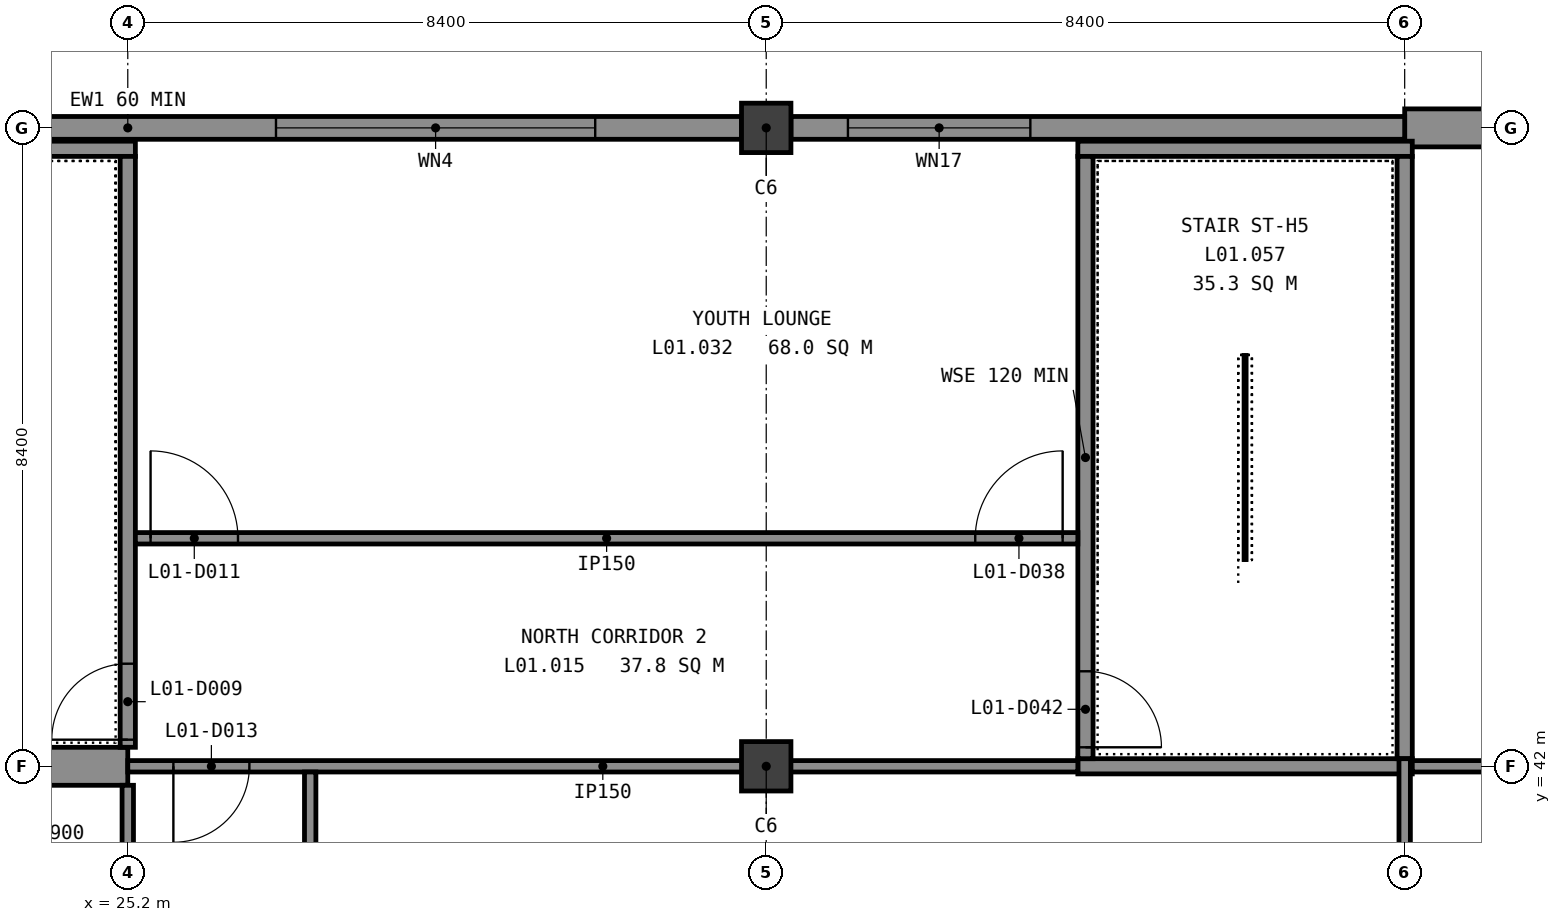
"""IFC4 building model, lengths in metres.
Left out: names, types, materials, properties, quantities, classifications, styles, units other than length and angle.
Written with IfcOpenShell. Run it as: python <this file> out.ifc"""

import sys

from ifc_helpers import new_model, si_unit, direction, frame, frame_2d, origin, origin_2d, place, context, subcontext, project, spatial, rectangle, extrude, element, fill, save


model = new_model("IFC4")
c1 = context("Model", 3, precision=1e-05, world=origin(), true_north=direction((0.0, 1.0)))
c2 = subcontext(c1, "Body", "Model", "MODEL_VIEW")
j1 = project(units=[si_unit("LENGTHUNIT", "METRE"), si_unit("PLANEANGLEUNIT", "RADIAN")], contexts=[c1])
p1 = place(None, origin())
s1 = spatial("IfcSite", under=j1, at=p1, CompositionType="ELEMENT")
p2 = place(p1, origin())
s2 = spatial("IfcBuilding", under=s1, at=p2, CompositionType="ELEMENT")
p3 = place(p2, frame((0.0, 0.0, 5.4)))
s3 = spatial("IfcBuildingStorey", under=s2, at=p3, CompositionType="ELEMENT", Elevation=5.4)
for number, where, z_axis, x_axis in (
    (1, (33.6, 42.0, -0.3), (0.0, 0.0, 1.0), (1.0, 0.0, 0.0)),
    (2, (33.6, 50.4, -0.3), (0.0, 0.0, 1.0), (1.0, 0.0, 0.0)),
):
    element("IfcColumn", number, at=place(p3, frame(where, z_axis=z_axis, x_axis=x_axis)), inside=s3, PredefinedType="COLUMN", context=c2, shape_type="SweptSolid", body=[
        extrude(rectangle(XDim=0.65, YDim=0.65, at=origin_2d()), origin(), (0.0, 0.0, 1.0), 4.55),
    ])
p4 = place(p3, frame((42.0, 50.4, -0.3), z_axis=(0.0, 0.0, 1.0), x_axis=(1.0, 0.0, 0.0)))
e3 = element("IfcWall", 3, at=p4, inside=s3, PredefinedType="SHEAR", context=c2, shape_type="SweptSolid", body=[
    extrude(rectangle(XDim=42.0, YDim=0.5, at=frame_2d((21.0, 0.0))), origin(), (0.0, 0.0, 1.0), 4.55),
])
p5 = place(p3, frame((0.0, 42.0, -0.3), z_axis=(0.0, 0.0, 1.0), x_axis=(1.0, 0.0, 0.0)))
e4 = element("IfcWall", 4, at=p5, inside=s3, PredefinedType="SHEAR", context=c2, shape_type="SweptSolid", body=[
    extrude(rectangle(XDim=25.2, YDim=0.5, at=frame_2d((12.6, 0.0))), origin(), (0.0, 0.0, 1.0), 4.55),
])
p6 = place(p5, frame((22.05, 0.0, 0.3)))
e5 = element("IfcOpeningElement", 5, at=p6, cuts=e4, PredefinedType="OPENING", context=c2, shape_type="SweptSolid", body=[
    extrude(rectangle(XDim=2.1, YDim=2.1, at=frame_2d((1.05, 1.05))), frame((0.0, 0.26, 0.0), z_axis=(0.0, -1.0, 0.0), x_axis=(1.0, 0.0, 0.0)), (0.0, 0.0, 1.0), 0.52),
])
p7 = place(p5, frame((10.0, 0.0, 0.3)))
e6 = element("IfcOpeningElement", 6, at=p7, cuts=e4, PredefinedType="OPENING", context=c2, shape_type="SweptSolid", body=[
    extrude(rectangle(XDim=1.0, YDim=2.1, at=frame_2d((0.5, 1.05))), frame((0.0, 0.26, 0.0), z_axis=(0.0, -1.0, 0.0), x_axis=(1.0, 0.0, 0.0)), (0.0, 0.0, 1.0), 0.52),
])
p8 = place(p3, frame((17.125, 50.4, 0.0), z_axis=(0.0, 0.0, 1.0), x_axis=(1.0, 0.0, 0.0)))
e7 = element("IfcWall", 7, at=p8, inside=s3, PredefinedType="STANDARD", context=c2, shape_type="SweptSolid", body=[
    extrude(rectangle(XDim=16.15, YDim=0.3, at=frame_2d((8.075, 0.0))), origin(), (0.0, 0.0, 1.0), 4.2),
])
p9 = place(p8, frame((1.337, 0.0, 0.9)))
e8 = element("IfcOpeningElement", 8, at=p9, cuts=e7, PredefinedType="OPENING", context=c2, shape_type="SweptSolid", body=[
    extrude(rectangle(XDim=1.2, YDim=1.5, at=frame_2d((0.6, 0.75))), frame((0.0, 0.16, 0.0), z_axis=(0.0, -1.0, 0.0), x_axis=(1.0, 0.0, 0.0)), (0.0, 0.0, 1.0), 0.32),
])
p10 = place(p8, frame((10.025, 0.0, 0.9)))
e9 = element("IfcOpeningElement", 9, at=p10, cuts=e7, PredefinedType="OPENING", context=c2, shape_type="SweptSolid", body=[
    extrude(rectangle(XDim=4.2, YDim=1.5, at=frame_2d((2.1, 0.75))), frame((0.0, 0.16, 0.0), z_axis=(0.0, -1.0, 0.0), x_axis=(1.0, 0.0, 0.0)), (0.0, 0.0, 1.0), 0.32),
])
p11 = place(p3, frame((33.925, 50.4, 0.0), z_axis=(0.0, 0.0, 1.0), x_axis=(1.0, 0.0, 0.0)))
e10 = element("IfcWall", 10, at=p11, inside=s3, PredefinedType="STANDARD", context=c2, shape_type="SweptSolid", body=[
    extrude(rectangle(XDim=8.075, YDim=0.3, at=frame_2d((4.038, 0.0))), origin(), (0.0, 0.0, 1.0), 4.2),
])
p12 = place(p11, frame((0.75, 0.0, 0.9)))
e11 = element("IfcOpeningElement", 11, at=p12, cuts=e10, PredefinedType="OPENING", context=c2, shape_type="SweptSolid", body=[
    extrude(rectangle(XDim=2.4, YDim=1.5, at=frame_2d((1.2, 0.75))), frame((0.0, 0.16, 0.0), z_axis=(0.0, -1.0, 0.0), x_axis=(1.0, 0.0, 0.0)), (0.0, 0.0, 1.0), 0.32),
])
p13 = place(p3, frame((20.9, 50.125, -0.3), z_axis=(0.0, 0.0, 1.0), x_axis=(1.0, 0.0, 0.0)))
e12 = element("IfcWall", 12, at=p13, inside=s3, PredefinedType="SHEAR", context=c2, shape_type="SweptSolid", body=[
    extrude(rectangle(XDim=4.4, YDim=0.2, at=frame_2d((2.2, 0.0))), origin(), (0.0, 0.0, 1.0), 4.5),
])
p14 = place(p3, frame((25.2, 42.25, -0.3), z_axis=(0.0, 0.0, 1.0), x_axis=(0.0, 1.0, 0.0)))
e13 = element("IfcWall", 13, at=p14, inside=s3, PredefinedType="SHEAR", context=c2, shape_type="SweptSolid", body=[
    extrude(rectangle(XDim=7.775, YDim=0.2, at=frame_2d((3.887, 0.0))), origin(), (0.0, 0.0, 1.0), 4.5),
])
p15 = place(p14, frame((0.1, 0.0, 0.3)))
e14 = element("IfcOpeningElement", 14, at=p15, cuts=e13, PredefinedType="OPENING", context=c2, shape_type="SweptSolid", body=[
    extrude(rectangle(XDim=1.0, YDim=2.1, at=frame_2d((0.5, 1.05))), frame((0.0, 0.11, 0.0), z_axis=(0.0, -1.0, 0.0), x_axis=(1.0, 0.0, 0.0)), (0.0, 0.0, 1.0), 0.22),
])
for number, where, z_axis, x_axis in (
    (15, (37.7, 42.0, -0.3), (0.0, 0.0, 1.0), (1.0, 0.0, 0.0)),
    (16, (37.7, 50.125, -0.3), (0.0, 0.0, 1.0), (1.0, 0.0, 0.0)),
):
    element("IfcWall", number, at=place(p3, frame(where, z_axis=z_axis, x_axis=x_axis)), inside=s3, PredefinedType="SHEAR", context=c2, shape_type="SweptSolid", body=[
        extrude(rectangle(XDim=4.4, YDim=0.2, at=frame_2d((2.2, 0.0))), origin(), (0.0, 0.0, 1.0), 4.5),
    ])
p16 = place(p3, frame((37.8, 42.1, -0.3), z_axis=(0.0, 0.0, 1.0), x_axis=(0.0, 1.0, 0.0)))
e17 = element("IfcWall", 17, at=p16, inside=s3, PredefinedType="SHEAR", context=c2, shape_type="SweptSolid", body=[
    extrude(rectangle(XDim=7.925, YDim=0.2, at=frame_2d((3.962, 0.0))), origin(), (0.0, 0.0, 1.0), 4.5),
])
p17 = place(p16, frame((0.15, 0.0, 0.3)))
e18 = element("IfcOpeningElement", 18, at=p17, cuts=e17, PredefinedType="OPENING", context=c2, shape_type="SweptSolid", body=[
    extrude(rectangle(XDim=1.0, YDim=2.1, at=frame_2d((0.5, 1.05))), frame((0.0, 0.11, 0.0), z_axis=(0.0, -1.0, 0.0), x_axis=(1.0, 0.0, 0.0)), (0.0, 0.0, 1.0), 0.22),
])
p18 = place(p3, frame((42.0, 42.1, -0.3), z_axis=(0.0, 0.0, 1.0), x_axis=(0.0, 1.0, 0.0)))
e19 = element("IfcWall", 19, at=p18, inside=s3, PredefinedType="SHEAR", context=c2, shape_type="SweptSolid", body=[
    extrude(rectangle(XDim=7.925, YDim=0.2, at=frame_2d((3.962, 0.0))), origin(), (0.0, 0.0, 1.0), 4.5),
])
p19 = place(p3, frame((42.1, 42.0, -0.3), z_axis=(0.0, 0.0, 1.0), x_axis=(1.0, 0.0, 0.0)))
e20 = element("IfcWall", 20, at=p19, inside=s3, PredefinedType="PARTITIONING", context=c2, shape_type="SweptSolid", body=[
    extrude(rectangle(XDim=41.9, YDim=0.15, at=frame_2d((20.95, 0.0))), origin(), (0.0, 0.0, 1.0), 4.5),
])
p20 = place(p3, frame((25.2, 42.0, 0.0), z_axis=(0.0, 0.0, 1.0), x_axis=(1.0, 0.0, 0.0)))
e21 = element("IfcWall", 21, at=p20, inside=s3, PredefinedType="PARTITIONING", context=c2, shape_type="SweptSolid", body=[
    extrude(rectangle(XDim=12.5, YDim=0.15, at=frame_2d((6.25, 0.0))), origin(), (0.0, 0.0, 1.0), 4.2),
])
p21 = place(p20, frame((0.6, 0.0, 0.0)))
e22 = element("IfcOpeningElement", 22, at=p21, cuts=e21, PredefinedType="OPENING", context=c2, shape_type="SweptSolid", body=[
    extrude(rectangle(XDim=1.0, YDim=2.1, at=frame_2d((0.5, 1.05))), frame((0.0, 0.085, 0.0), z_axis=(0.0, -1.0, 0.0), x_axis=(1.0, 0.0, 0.0)), (0.0, 0.0, 1.0), 0.17),
])
p22 = place(p3, frame((25.3, 45.0, 0.0), z_axis=(0.0, 0.0, 1.0), x_axis=(1.0, 0.0, 0.0)))
e23 = element("IfcWall", 23, at=p22, inside=s3, PredefinedType="PARTITIONING", context=c2, shape_type="SweptSolid", body=[
    extrude(rectangle(XDim=12.4, YDim=0.15, at=frame_2d((6.2, 0.0))), origin(), (0.0, 0.0, 1.0), 4.2),
])
p23 = place(p22, frame((0.2, 0.0, 0.0)))
e24 = element("IfcOpeningElement", 24, at=p23, cuts=e23, PredefinedType="OPENING", context=c2, shape_type="SweptSolid", body=[
    extrude(rectangle(XDim=1.15, YDim=2.1, at=frame_2d((0.575, 1.05))), frame((0.0, 0.085, 0.0), z_axis=(0.0, -1.0, 0.0), x_axis=(1.0, 0.0, 0.0)), (0.0, 0.0, 1.0), 0.17),
])
p24 = place(p22, frame((11.05, 0.0, 0.0)))
e25 = element("IfcOpeningElement", 25, at=p24, cuts=e23, PredefinedType="OPENING", context=c2, shape_type="SweptSolid", body=[
    extrude(rectangle(XDim=1.15, YDim=2.1, at=frame_2d((0.575, 1.05))), frame((0.0, 0.085, 0.0), z_axis=(0.0, -1.0, 0.0), x_axis=(1.0, 0.0, 0.0)), (0.0, 0.0, 1.0), 0.17),
])
p25 = place(p3, frame((25.2, 37.8, 0.0), z_axis=(0.0, 0.0, 1.0), x_axis=(0.0, 1.0, 0.0)))
e26 = element("IfcWall", 26, at=p25, inside=s3, PredefinedType="PARTITIONING", context=c2, shape_type="SweptSolid", body=[
    extrude(rectangle(XDim=3.95, YDim=0.15, at=frame_2d((1.975, 0.0))), origin(), (0.0, 0.0, 1.0), 3.6),
])
p26 = place(p25, frame((1.4, 0.0, 0.0)))
e27 = element("IfcOpeningElement", 27, at=p26, cuts=e26, PredefinedType="OPENING", context=c2, shape_type="SweptSolid", body=[
    extrude(rectangle(XDim=1.0, YDim=2.1, at=frame_2d((0.5, 1.05))), frame((0.0, 0.085, 0.0), z_axis=(0.0, -1.0, 0.0), x_axis=(1.0, 0.0, 0.0)), (0.0, 0.0, 1.0), 0.17),
])
p27 = place(p3, frame((27.6, 33.5, 0.0), z_axis=(0.0, 0.0, 1.0), x_axis=(0.0, 1.0, 0.0)))
e28 = element("IfcWall", 28, at=p27, inside=s3, PredefinedType="PARTITIONING", context=c2, shape_type="SweptSolid", body=[
    extrude(rectangle(XDim=8.425, YDim=0.15, at=frame_2d((4.212, 0.0))), origin(), (0.0, 0.0, 1.0), 4.2),
])
p28 = place(p3, frame((42.0, 37.8, 0.0), z_axis=(0.0, 0.0, 1.0), x_axis=(0.0, 1.0, 0.0)))
e29 = element("IfcWall", 29, at=p28, inside=s3, PredefinedType="PARTITIONING", context=c2, shape_type="SweptSolid", body=[
    extrude(rectangle(XDim=4.3, YDim=0.15, at=frame_2d((2.15, 0.0))), origin(), (0.0, 0.0, 1.0), 8.7),
])
p29 = place(p28, frame((1.6, 0.0, 0.0)))
e30 = element("IfcOpeningElement", 30, at=p29, cuts=e29, PredefinedType="OPENING", context=c2, shape_type="SweptSolid", body=[
    extrude(rectangle(XDim=1.0, YDim=2.1, at=frame_2d((0.5, 1.05))), frame((0.0, 0.085, 0.0), z_axis=(0.0, -1.0, 0.0), x_axis=(1.0, 0.0, 0.0)), (0.0, 0.0, 1.0), 0.17),
])
p30 = place(p10, origin())
e31 = element("IfcWindow", 31, at=p30, inside=s3, PartitioningType="SINGLE_PANEL", PredefinedType="WINDOW", context=c2, shape_type="SweptSolid", body=[
    extrude(rectangle(XDim=4.2, YDim=1.5, at=frame_2d((2.1, 0.75))), frame((0.0, 0.03, 0.0), z_axis=(0.0, -1.0, 0.0), x_axis=(1.0, 0.0, 0.0)), (0.0, 0.0, 1.0), 0.06),
])
fill(e9, e31)
p31 = place(p12, origin())
e32 = element("IfcWindow", 32, at=p31, inside=s3, PartitioningType="SINGLE_PANEL", PredefinedType="WINDOW", context=c2, shape_type="SweptSolid", body=[
    extrude(rectangle(XDim=2.4, YDim=1.5, at=frame_2d((1.2, 0.75))), frame((0.0, 0.03, 0.0), z_axis=(0.0, -1.0, 0.0), x_axis=(1.0, 0.0, 0.0)), (0.0, 0.0, 1.0), 0.06),
])
fill(e11, e32)
p32 = place(p15, origin())
e33 = element("IfcDoor", 33, at=p32, inside=s3, OperationType="SINGLE_SWING_RIGHT", PredefinedType="DOOR", context=c2, shape_type="SweptSolid", body=[
    extrude(rectangle(XDim=1.0, YDim=2.1, at=frame_2d((0.5, 1.05))), frame((0.0, 0.025, 0.0), z_axis=(0.0, -1.0, 0.0), x_axis=(1.0, 0.0, 0.0)), (0.0, 0.0, 1.0), 0.05),
])
fill(e14, e33)
p33 = place(p17, origin())
e34 = element("IfcDoor", 34, at=p33, inside=s3, OperationType="SINGLE_SWING_LEFT", PredefinedType="DOOR", context=c2, shape_type="SweptSolid", body=[
    extrude(rectangle(XDim=1.0, YDim=2.1, at=frame_2d((0.5, 1.05))), frame((0.0, 0.025, 0.0), z_axis=(0.0, -1.0, 0.0), x_axis=(1.0, 0.0, 0.0)), (0.0, 0.0, 1.0), 0.05),
])
fill(e18, e34)
p34 = place(p23, origin())
e35 = element("IfcDoor", 35, at=p34, inside=s3, OperationType="SINGLE_SWING_RIGHT", PredefinedType="DOOR", context=c2, shape_type="SweptSolid", body=[
    extrude(rectangle(XDim=1.15, YDim=2.1, at=frame_2d((0.575, 1.05))), frame((0.0, 0.025, 0.0), z_axis=(0.0, -1.0, 0.0), x_axis=(1.0, 0.0, 0.0)), (0.0, 0.0, 1.0), 0.05),
])
fill(e24, e35)
p35 = place(p24, origin())
e36 = element("IfcDoor", 36, at=p35, inside=s3, OperationType="SINGLE_SWING_LEFT", PredefinedType="DOOR", context=c2, shape_type="SweptSolid", body=[
    extrude(rectangle(XDim=1.15, YDim=2.1, at=frame_2d((0.575, 1.05))), frame((0.0, 0.025, 0.0), z_axis=(0.0, -1.0, 0.0), x_axis=(1.0, 0.0, 0.0)), (0.0, 0.0, 1.0), 0.05),
])
fill(e25, e36)
p36 = place(p21, origin())
e37 = element("IfcDoor", 37, at=p36, inside=s3, OperationType="SINGLE_SWING_LEFT", PredefinedType="DOOR", context=c2, shape_type="SweptSolid", body=[
    extrude(rectangle(XDim=1.0, YDim=2.1, at=frame_2d((0.5, 1.05))), frame((0.0, 0.025, 0.0), z_axis=(0.0, -1.0, 0.0), x_axis=(1.0, 0.0, 0.0)), (0.0, 0.0, 1.0), 0.05),
])
fill(e22, e37)
save(model, sys.argv[1])
